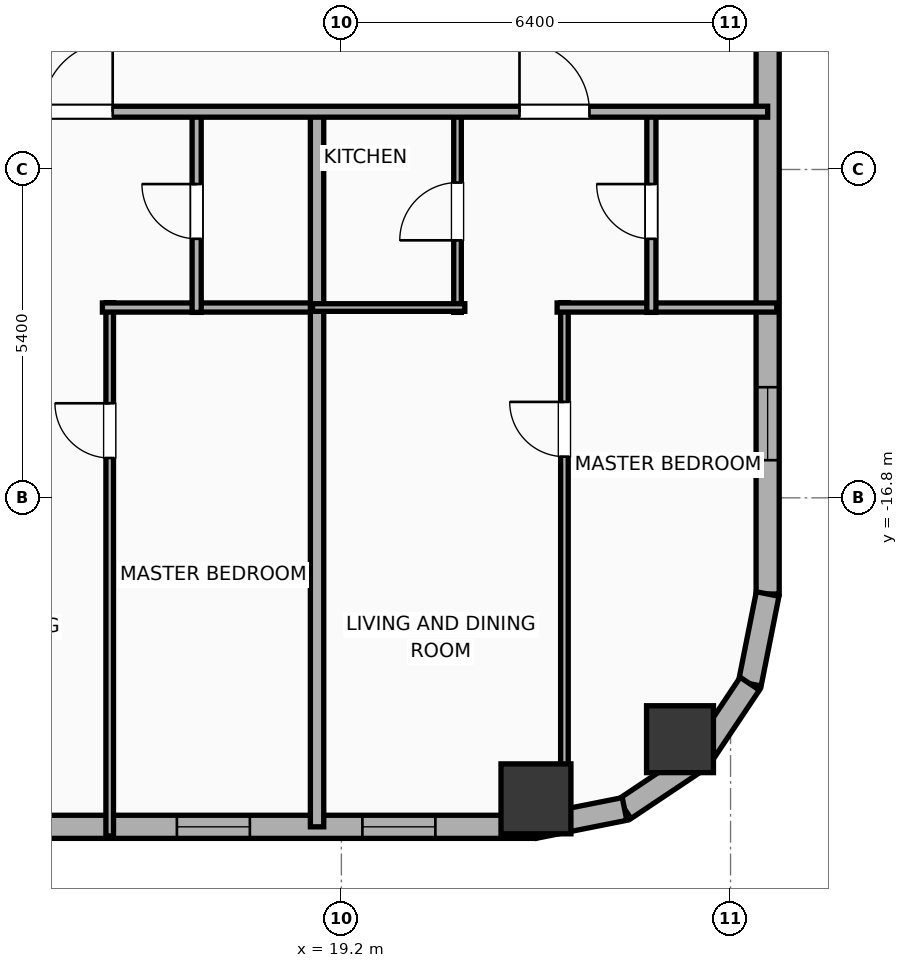
"""IFC4 building model, lengths in metres.
Left out: names, types, materials, properties, quantities, classifications, styles, units other than length and angle.
Written with IfcOpenShell. Run it as: python <this file> out.ifc"""

import sys

from ifc_helpers import new_model, si_unit, direction, frame, frame_2d, origin, origin_2d, place, context, subcontext, project, spatial, rectangle, hollow_rectangle, hollow_circle, extrude, element, fill, save


model = new_model("IFC4")
c1 = context("Model", 3, precision=1e-05, world=origin(), true_north=direction((0.0, 1.0)))
c2 = subcontext(c1, "Body", "Model", "MODEL_VIEW")
j1 = project(units=[si_unit("LENGTHUNIT", "METRE"), si_unit("PLANEANGLEUNIT", "RADIAN")], contexts=[c1])
p1 = place(None, origin())
s1 = spatial("IfcSite", under=j1, at=p1, CompositionType="ELEMENT")
p2 = place(p1, origin())
s2 = spatial("IfcBuilding", under=s1, at=p2, CompositionType="ELEMENT")
p3 = place(p2, frame((0.0, 0.0, 72.8)))
s3 = spatial("IfcBuildingStorey", under=s2, at=p3, CompositionType="ELEMENT", Elevation=72.8)
p4 = place(p3, frame((22.4, -21.75, 0.0), z_axis=(0.0, 0.0, 1.0), x_axis=(1.0, 0.0, 0.0)))
e1 = element("IfcColumn", 1, at=p4, inside=s3, PredefinedType="COLUMN", context=c2, shape_type="SweptSolid", body=[
    extrude(hollow_rectangle(XDim=1.15, YDim=1.15, WallThickness=0.04, at=origin_2d()), origin(), (0.0, 0.0, 1.0), 3.9),
])
p5 = place(p3, frame((24.769, -20.769, 0.0), z_axis=(0.0, 0.0, 1.0), x_axis=(1.0, 0.0, 0.0)))
e2 = element("IfcColumn", 2, at=p5, inside=s3, PredefinedType="COLUMN", context=c2, shape_type="SweptSolid", body=[
    extrude(hollow_circle(Radius=0.55, WallThickness=0.036, at=origin_2d()), origin(), (0.0, 0.0, 1.0), 3.9),
])
p6 = place(p3, frame((22.381, -22.21, 0.0), z_axis=(0.0, 0.0, 1.0), x_axis=(-1.0, 0.0, 0.0)))
e3 = element("IfcWall", 3, at=p6, inside=s3, PredefinedType="ELEMENTEDWALL", context=c2, shape_type="SweptSolid", body=[
    extrude(rectangle(XDim=51.963, YDim=0.38, at=frame_2d((25.981, 0.0))), origin(), (0.0, 0.0, 1.0), 3.65),
])
p7 = place(p6, frame((50.372, 0.0, 0.75)))
e4 = element("IfcOpeningElement", 4, at=p7, cuts=e3, PredefinedType="OPENING", context=c2, shape_type="SweptSolid", body=[
    extrude(rectangle(XDim=0.52, YDim=2.05, at=frame_2d((0.26, 1.025))), frame((0.0, 0.2, 0.0), z_axis=(0.0, -1.0, 0.0), x_axis=(1.0, 0.0, 0.0)), (0.0, 0.0, 1.0), 0.4),
])
p8 = place(p6, frame((45.681, 0.0, 0.75)))
e5 = element("IfcOpeningElement", 5, at=p8, cuts=e3, PredefinedType="OPENING", context=c2, shape_type="SweptSolid", body=[
    extrude(rectangle(XDim=1.2, YDim=2.05, at=frame_2d((0.6, 1.025))), frame((0.0, 0.2, 0.0), z_axis=(0.0, -1.0, 0.0), x_axis=(1.0, 0.0, 0.0)), (0.0, 0.0, 1.0), 0.4),
])
p9 = place(p6, frame((48.485, 0.0, 0.75)))
e6 = element("IfcOpeningElement", 6, at=p9, cuts=e3, PredefinedType="OPENING", context=c2, shape_type="SweptSolid", body=[
    extrude(rectangle(XDim=1.2, YDim=2.05, at=frame_2d((0.6, 1.025))), frame((0.0, 0.2, 0.0), z_axis=(0.0, -1.0, 0.0), x_axis=(1.0, 0.0, 0.0)), (0.0, 0.0, 1.0), 0.4),
])
p10 = place(p6, frame((42.426, 0.0, 0.75)))
e7 = element("IfcOpeningElement", 7, at=p10, cuts=e3, PredefinedType="OPENING", context=c2, shape_type="SweptSolid", body=[
    extrude(rectangle(XDim=1.2, YDim=2.05, at=frame_2d((0.6, 1.025))), frame((0.0, 0.2, 0.0), z_axis=(0.0, -1.0, 0.0), x_axis=(1.0, 0.0, 0.0)), (0.0, 0.0, 1.0), 0.4),
])
p11 = place(p6, frame((37.486, 0.0, 0.75)))
e8 = element("IfcOpeningElement", 8, at=p11, cuts=e3, PredefinedType="OPENING", context=c2, shape_type="SweptSolid", body=[
    extrude(rectangle(XDim=1.2, YDim=2.05, at=frame_2d((0.6, 1.025))), frame((0.0, 0.2, 0.0), z_axis=(0.0, -1.0, 0.0), x_axis=(1.0, 0.0, 0.0)), (0.0, 0.0, 1.0), 0.4),
])
p12 = place(p6, frame((33.386, 0.0, 0.75)))
e9 = element("IfcOpeningElement", 9, at=p12, cuts=e3, PredefinedType="OPENING", context=c2, shape_type="SweptSolid", body=[
    extrude(rectangle(XDim=1.2, YDim=2.05, at=frame_2d((0.6, 1.025))), frame((0.0, 0.2, 0.0), z_axis=(0.0, -1.0, 0.0), x_axis=(1.0, 0.0, 0.0)), (0.0, 0.0, 1.0), 0.4),
])
p13 = place(p6, frame((29.166, 0.0, 0.75)))
e10 = element("IfcOpeningElement", 10, at=p13, cuts=e3, PredefinedType="OPENING", context=c2, shape_type="SweptSolid", body=[
    extrude(rectangle(XDim=1.2, YDim=2.05, at=frame_2d((0.6, 1.025))), frame((0.0, 0.2, 0.0), z_axis=(0.0, -1.0, 0.0), x_axis=(1.0, 0.0, 0.0)), (0.0, 0.0, 1.0), 0.4),
])
p14 = place(p6, frame((26.081, 0.0, 0.75)))
e11 = element("IfcOpeningElement", 11, at=p14, cuts=e3, PredefinedType="OPENING", context=c2, shape_type="SweptSolid", body=[
    extrude(rectangle(XDim=1.2, YDim=2.05, at=frame_2d((0.6, 1.025))), frame((0.0, 0.2, 0.0), z_axis=(0.0, -1.0, 0.0), x_axis=(1.0, 0.0, 0.0)), (0.0, 0.0, 1.0), 0.4),
])
p15 = place(p6, frame((21.981, 0.0, 0.75)))
e12 = element("IfcOpeningElement", 12, at=p15, cuts=e3, PredefinedType="OPENING", context=c2, shape_type="SweptSolid", body=[
    extrude(rectangle(XDim=1.2, YDim=2.05, at=frame_2d((0.6, 1.025))), frame((0.0, 0.2, 0.0), z_axis=(0.0, -1.0, 0.0), x_axis=(1.0, 0.0, 0.0)), (0.0, 0.0, 1.0), 0.4),
])
p16 = place(p6, frame((16.986, 0.0, 0.75)))
e13 = element("IfcOpeningElement", 13, at=p16, cuts=e3, PredefinedType="OPENING", context=c2, shape_type="SweptSolid", body=[
    extrude(rectangle(XDim=1.2, YDim=2.05, at=frame_2d((0.6, 1.025))), frame((0.0, 0.2, 0.0), z_axis=(0.0, -1.0, 0.0), x_axis=(1.0, 0.0, 0.0)), (0.0, 0.0, 1.0), 0.4),
])
p17 = place(p6, frame((12.886, 0.0, 0.75)))
e14 = element("IfcOpeningElement", 14, at=p17, cuts=e3, PredefinedType="OPENING", context=c2, shape_type="SweptSolid", body=[
    extrude(rectangle(XDim=1.2, YDim=2.05, at=frame_2d((0.6, 1.025))), frame((0.0, 0.2, 0.0), z_axis=(0.0, -1.0, 0.0), x_axis=(1.0, 0.0, 0.0)), (0.0, 0.0, 1.0), 0.4),
])
p18 = place(p6, frame((8.306, 0.0, 0.75)))
e15 = element("IfcOpeningElement", 15, at=p18, cuts=e3, PredefinedType="OPENING", context=c2, shape_type="SweptSolid", body=[
    extrude(rectangle(XDim=1.2, YDim=2.05, at=frame_2d((0.6, 1.025))), frame((0.0, 0.2, 0.0), z_axis=(0.0, -1.0, 0.0), x_axis=(1.0, 0.0, 0.0)), (0.0, 0.0, 1.0), 0.4),
])
p19 = place(p6, frame((4.686, 0.0, 0.75)))
e16 = element("IfcOpeningElement", 16, at=p19, cuts=e3, PredefinedType="OPENING", context=c2, shape_type="SweptSolid", body=[
    extrude(rectangle(XDim=1.2, YDim=2.05, at=frame_2d((0.6, 1.025))), frame((0.0, 0.2, 0.0), z_axis=(0.0, -1.0, 0.0), x_axis=(1.0, 0.0, 0.0)), (0.0, 0.0, 1.0), 0.4),
])
p20 = place(p6, frame((1.635, 0.0, 0.75)))
e17 = element("IfcOpeningElement", 17, at=p20, cuts=e3, PredefinedType="OPENING", context=c2, shape_type="SweptSolid", body=[
    extrude(rectangle(XDim=1.2, YDim=2.05, at=frame_2d((0.6, 1.025))), frame((0.0, 0.2, 0.0), z_axis=(0.0, -1.0, 0.0), x_axis=(1.0, 0.0, 0.0)), (0.0, 0.0, 1.0), 0.4),
])
p21 = place(p3, frame((26.21, 18.381, 0.0), z_axis=(0.0, 0.0, 1.0), x_axis=(0.0, -1.0, 0.0)))
e18 = element("IfcWall", 18, at=p21, inside=s3, PredefinedType="ELEMENTEDWALL", context=c2, shape_type="SweptSolid", body=[
    extrude(rectangle(XDim=36.763, YDim=0.38, at=frame_2d((18.381, 0.0))), origin(), (0.0, 0.0, 1.0), 3.65),
])
p22 = place(p21, frame((33.362, 0.0, 0.75)))
e19 = element("IfcOpeningElement", 19, at=p22, cuts=e18, PredefinedType="OPENING", context=c2, shape_type="SweptSolid", body=[
    extrude(rectangle(XDim=1.2, YDim=2.05, at=frame_2d((0.6, 1.025))), frame((0.0, 0.2, 0.0), z_axis=(0.0, -1.0, 0.0), x_axis=(1.0, 0.0, 0.0)), (0.0, 0.0, 1.0), 0.4),
])
p23 = place(p3, frame((26.21, -18.381, 0.0), z_axis=(0.0, 0.0, 1.0), x_axis=(-0.195086038585, -0.980786132421, 0.0)))
e20 = element("IfcWall", 20, at=p23, inside=s3, PredefinedType="ELEMENTEDWALL", context=c2, shape_type="SweptSolid", body=[
    extrude(rectangle(XDim=1.504, YDim=0.38, at=frame_2d((0.752, 0.0))), origin(), (0.0, 0.0, 1.0), 3.65),
])
for number, where, z_axis, x_axis in (
    (21, (25.917, -19.857, 0.0), (0.0, 0.0, 1.0), (-0.556, -0.831, 0.0)),
    (22, (25.091, -21.091, 0.0), (0.0, 0.0, 1.0), (-0.831, -0.556, 0.0)),
):
    element("IfcWall", number, at=place(p3, frame(where, z_axis=z_axis, x_axis=x_axis)), inside=s3, PredefinedType="ELEMENTEDWALL", context=c2, shape_type="SweptSolid", body=[
        extrude(rectangle(XDim=1.485, YDim=0.38, at=frame_2d((0.743, 0.0))), origin(), (0.0, 0.0, 1.0), 3.65),
    ])
p24 = place(p3, frame((23.857, -21.917, 0.0), z_axis=(0.0, 0.0, 1.0), x_axis=(-0.980786132421, -0.195086038585, 0.0)))
e23 = element("IfcWall", 23, at=p24, inside=s3, PredefinedType="ELEMENTEDWALL", context=c2, shape_type="SweptSolid", body=[
    extrude(rectangle(XDim=1.504, YDim=0.38, at=frame_2d((0.752, 0.0))), origin(), (0.0, 0.0, 1.0), 3.65),
])
p25 = place(p3, frame((15.39, -22.36, 0.0), z_axis=(0.0, 0.0, 1.0), x_axis=(0.0, 1.0, 0.0)))
e24 = element("IfcWall", 24, at=p25, inside=s3, PredefinedType="PARTITIONING", context=c2, shape_type="SweptSolid", body=[
    extrude(rectangle(XDim=8.77, YDim=0.125, at=frame_2d((4.385, 0.0))), origin(), (0.0, 0.0, 1.0), 3.65),
])
p26 = place(p25, frame((6.215, 0.0, 0.0)))
e25 = element("IfcOpeningElement", 25, at=p26, cuts=e24, PredefinedType="OPENING", context=c2, shape_type="SweptSolid", body=[
    extrude(rectangle(XDim=0.9, YDim=2.05, at=frame_2d((0.45, 1.025))), frame((0.0, 0.073, 0.0), z_axis=(0.0, -1.0, 0.0), x_axis=(1.0, 0.0, 0.0)), (0.0, 0.0, 1.0), 0.145),
])
p27 = place(p3, frame((15.27, -13.67, 0.0), z_axis=(0.0, 0.0, 1.0), x_axis=(1.0, 0.0, 0.0)))
e26 = element("IfcWall", 26, at=p27, inside=s3, PredefinedType="PLUMBINGWALL", context=c2, shape_type="SweptSolid", body=[
    extrude(rectangle(XDim=3.605, YDim=0.15, at=frame_2d((1.802, 0.0))), origin(), (0.0, 0.0, 1.0), 3.65),
])
p28 = place(p3, frame((16.82, -13.75, 0.0), z_axis=(0.0, 0.0, 1.0), x_axis=(0.0, 1.0, 0.0)))
e27 = element("IfcWall", 27, at=p28, inside=s3, PredefinedType="PLUMBINGWALL", context=c2, shape_type="SweptSolid", body=[
    extrude(rectangle(XDim=3.32, YDim=0.15, at=frame_2d((1.66, 0.0))), origin(), (0.0, 0.0, 1.0), 3.65),
])
p29 = place(p28, frame((1.21, 0.0, 0.0)))
e28 = element("IfcOpeningElement", 28, at=p29, cuts=e27, PredefinedType="OPENING", context=c2, shape_type="SweptSolid", body=[
    extrude(rectangle(XDim=0.9, YDim=2.05, at=frame_2d((0.45, 1.025))), frame((0.0, 0.085, 0.0), z_axis=(0.0, -1.0, 0.0), x_axis=(1.0, 0.0, 0.0)), (0.0, 0.0, 1.0), 0.17),
])
p30 = place(p3, frame((18.8, -22.21, 0.0), z_axis=(0.0, 0.0, 1.0), x_axis=(0.0, 1.0, 0.0)))
e29 = element("IfcWall", 29, at=p30, inside=s3, PredefinedType="PARTITIONING", context=c2, shape_type="SweptSolid", body=[
    extrude(rectangle(XDim=11.84, YDim=0.22, at=frame_2d((5.92, 0.0))), origin(), (0.0, 0.0, 1.0), 3.65),
])
p31 = place(p3, frame((22.868, -22.266, 0.0), z_axis=(0.0, 0.0, 1.0), x_axis=(0.0, 1.0, 0.0)))
e30 = element("IfcWall", 30, at=p31, inside=s3, PredefinedType="PARTITIONING", context=c2, shape_type="SweptSolid", body=[
    extrude(rectangle(XDim=8.676, YDim=0.125, at=frame_2d((4.338, 0.0))), origin(), (0.0, 0.0, 1.0), 3.65),
])
p32 = place(p31, frame((6.144, 0.0, 0.0)))
e31 = element("IfcOpeningElement", 31, at=p32, cuts=e30, PredefinedType="OPENING", context=c2, shape_type="SweptSolid", body=[
    extrude(rectangle(XDim=0.9, YDim=2.05, at=frame_2d((0.45, 1.025))), frame((0.0, 0.073, 0.0), z_axis=(0.0, -1.0, 0.0), x_axis=(1.0, 0.0, 0.0)), (0.0, 0.0, 1.0), 0.145),
])
p33 = place(p3, frame((22.748, -13.67, 0.0), z_axis=(0.0, 0.0, 1.0), x_axis=(1.0, 0.0, 0.0)))
e32 = element("IfcWall", 32, at=p33, inside=s3, PredefinedType="PLUMBINGWALL", context=c2, shape_type="SweptSolid", body=[
    extrude(rectangle(XDim=3.612, YDim=0.15, at=frame_2d((1.806, 0.0))), origin(), (0.0, 0.0, 1.0), 3.65),
])
p34 = place(p3, frame((21.11, -13.75, 0.0), z_axis=(0.0, 0.0, 1.0), x_axis=(0.0, 1.0, 0.0)))
e33 = element("IfcWall", 33, at=p34, inside=s3, PredefinedType="PARTITIONING", context=c2, shape_type="SweptSolid", body=[
    extrude(rectangle(XDim=3.32, YDim=0.125, at=frame_2d((1.66, 0.0))), origin(), (0.0, 0.0, 1.0), 3.65),
])
p35 = place(p34, frame((1.185, 0.0, 0.0)))
e34 = element("IfcOpeningElement", 34, at=p35, cuts=e33, PredefinedType="OPENING", context=c2, shape_type="SweptSolid", body=[
    extrude(rectangle(XDim=0.95, YDim=2.05, at=frame_2d((0.475, 1.025))), frame((0.0, 0.073, 0.0), z_axis=(0.0, -1.0, 0.0), x_axis=(1.0, 0.0, 0.0)), (0.0, 0.0, 1.0), 0.145),
])
p36 = place(p3, frame((18.725, -13.67, 0.0), z_axis=(0.0, 0.0, 1.0), x_axis=(1.0, 0.0, 0.0)))
e35 = element("IfcWall", 35, at=p36, inside=s3, PredefinedType="PARTITIONING", context=c2, shape_type="SweptSolid", body=[
    extrude(rectangle(XDim=2.505, YDim=0.125, at=frame_2d((1.252, 0.0))), origin(), (0.0, 0.0, 1.0), 3.65),
])
p37 = place(p3, frame((24.298, -13.75, 0.0), z_axis=(0.0, 0.0, 1.0), x_axis=(0.0, 1.0, 0.0)))
e36 = element("IfcWall", 36, at=p37, inside=s3, PredefinedType="PLUMBINGWALL", context=c2, shape_type="SweptSolid", body=[
    extrude(rectangle(XDim=3.32, YDim=0.15, at=frame_2d((1.66, 0.0))), origin(), (0.0, 0.0, 1.0), 3.65),
])
p38 = place(p37, frame((1.21, 0.0, 0.0)))
e37 = element("IfcOpeningElement", 37, at=p38, cuts=e36, PredefinedType="OPENING", context=c2, shape_type="SweptSolid", body=[
    extrude(rectangle(XDim=0.9, YDim=2.05, at=frame_2d((0.45, 1.025))), frame((0.0, 0.085, 0.0), z_axis=(0.0, -1.0, 0.0), x_axis=(1.0, 0.0, 0.0)), (0.0, 0.0, 1.0), 0.17),
])
p39 = place(p3, frame((-33.41, -10.45, 0.0), z_axis=(0.0, 0.0, 1.0), x_axis=(1.0, 0.0, 0.0)))
e38 = element("IfcWall", 38, at=p39, inside=s3, PredefinedType="PARTITIONING", context=c2, shape_type="SweptSolid", body=[
    extrude(rectangle(XDim=59.62, YDim=0.18, at=frame_2d((29.81, 0.0))), origin(), (0.0, 0.0, 1.0), 3.65),
])
p40 = place(p39, frame((2.495, 0.0, 0.0)))
e39 = element("IfcOpeningElement", 39, at=p40, cuts=e38, PredefinedType="OPENING", context=c2, shape_type="SweptSolid", body=[
    extrude(rectangle(XDim=0.9, YDim=2.05, at=frame_2d((0.45, 1.025))), frame((0.0, 0.1, 0.0), z_axis=(0.0, -1.0, 0.0), x_axis=(1.0, 0.0, 0.0)), (0.0, 0.0, 1.0), 0.2),
])
p41 = place(p39, frame((8.905, 0.0, 0.0)))
e40 = element("IfcOpeningElement", 40, at=p41, cuts=e38, PredefinedType="OPENING", context=c2, shape_type="SweptSolid", body=[
    extrude(rectangle(XDim=1.15, YDim=2.05, at=frame_2d((0.575, 1.025))), frame((0.0, 0.1, 0.0), z_axis=(0.0, -1.0, 0.0), x_axis=(1.0, 0.0, 0.0)), (0.0, 0.0, 1.0), 0.2),
])
p42 = place(p39, frame((14.902, 0.0, 0.0)))
e41 = element("IfcOpeningElement", 41, at=p42, cuts=e38, PredefinedType="OPENING", context=c2, shape_type="SweptSolid", body=[
    extrude(rectangle(XDim=1.15, YDim=2.05, at=frame_2d((0.575, 1.025))), frame((0.0, 0.1, 0.0), z_axis=(0.0, -1.0, 0.0), x_axis=(1.0, 0.0, 0.0)), (0.0, 0.0, 1.0), 0.2),
])
p43 = place(p39, frame((23.112, 0.0, 0.0)))
e42 = element("IfcOpeningElement", 42, at=p43, cuts=e38, PredefinedType="OPENING", context=c2, shape_type="SweptSolid", body=[
    extrude(rectangle(XDim=1.15, YDim=2.05, at=frame_2d((0.575, 1.025))), frame((0.0, 0.1, 0.0), z_axis=(0.0, -1.0, 0.0), x_axis=(1.0, 0.0, 0.0)), (0.0, 0.0, 1.0), 0.2),
])
p44 = place(p39, frame((31.572, 0.0, 0.0)))
e43 = element("IfcOpeningElement", 43, at=p44, cuts=e38, PredefinedType="OPENING", context=c2, shape_type="SweptSolid", body=[
    extrude(rectangle(XDim=0.9, YDim=2.05, at=frame_2d((0.45, 1.025))), frame((0.0, 0.1, 0.0), z_axis=(0.0, -1.0, 0.0), x_axis=(1.0, 0.0, 0.0)), (0.0, 0.0, 1.0), 0.2),
])
p45 = place(p39, frame((39.502, 0.0, 0.0)))
e44 = element("IfcOpeningElement", 44, at=p45, cuts=e38, PredefinedType="OPENING", context=c2, shape_type="SweptSolid", body=[
    extrude(rectangle(XDim=1.15, YDim=2.05, at=frame_2d((0.575, 1.025))), frame((0.0, 0.1, 0.0), z_axis=(0.0, -1.0, 0.0), x_axis=(1.0, 0.0, 0.0)), (0.0, 0.0, 1.0), 0.2),
])
p46 = place(p39, frame((47.699, 0.0, 0.0)))
e45 = element("IfcOpeningElement", 45, at=p46, cuts=e38, PredefinedType="OPENING", context=c2, shape_type="SweptSolid", body=[
    extrude(rectangle(XDim=1.15, YDim=2.05, at=frame_2d((0.575, 1.025))), frame((0.0, 0.1, 0.0), z_axis=(0.0, -1.0, 0.0), x_axis=(1.0, 0.0, 0.0)), (0.0, 0.0, 1.0), 0.2),
])
p47 = place(p39, frame((55.539, 0.0, 0.0)))
e46 = element("IfcOpeningElement", 46, at=p47, cuts=e38, PredefinedType="OPENING", context=c2, shape_type="SweptSolid", body=[
    extrude(rectangle(XDim=1.15, YDim=2.05, at=frame_2d((0.575, 1.025))), frame((0.0, 0.1, 0.0), z_axis=(0.0, -1.0, 0.0), x_axis=(1.0, 0.0, 0.0)), (0.0, 0.0, 1.0), 0.2),
])
p48 = place(p19, origin())
e47 = element("IfcWindow", 47, at=p48, inside=s3, PartitioningType="SINGLE_PANEL", PredefinedType="WINDOW", context=c2, shape_type="SweptSolid", body=[
    extrude(rectangle(XDim=1.2, YDim=2.05, at=frame_2d((0.6, 1.025))), frame((0.0, 0.03, 0.0), z_axis=(0.0, -1.0, 0.0), x_axis=(1.0, 0.0, 0.0)), (0.0, 0.0, 1.0), 0.06),
])
fill(e16, e47)
p49 = place(p20, origin())
e48 = element("IfcWindow", 48, at=p49, inside=s3, PartitioningType="SINGLE_PANEL", PredefinedType="WINDOW", context=c2, shape_type="SweptSolid", body=[
    extrude(rectangle(XDim=1.2, YDim=2.05, at=frame_2d((0.6, 1.025))), frame((0.0, 0.03, 0.0), z_axis=(0.0, -1.0, 0.0), x_axis=(1.0, 0.0, 0.0)), (0.0, 0.0, 1.0), 0.06),
])
fill(e17, e48)
p50 = place(p22, origin())
e49 = element("IfcWindow", 49, at=p50, inside=s3, PartitioningType="SINGLE_PANEL", PredefinedType="WINDOW", context=c2, shape_type="SweptSolid", body=[
    extrude(rectangle(XDim=1.2, YDim=2.05, at=frame_2d((0.6, 1.025))), frame((0.0, 0.03, 0.0), z_axis=(0.0, -1.0, 0.0), x_axis=(1.0, 0.0, 0.0)), (0.0, 0.0, 1.0), 0.06),
])
fill(e19, e49)
p51 = place(p26, origin())
e50 = element("IfcDoor", 50, at=p51, inside=s3, OperationType="SINGLE_SWING_RIGHT", PredefinedType="DOOR", context=c2, shape_type="SweptSolid", body=[
    extrude(rectangle(XDim=0.9, YDim=2.05, at=frame_2d((0.45, 1.025))), frame((0.0, 0.025, 0.0), z_axis=(0.0, -1.0, 0.0), x_axis=(1.0, 0.0, 0.0)), (0.0, 0.0, 1.0), 0.05),
])
fill(e25, e50)
p52 = place(p29, origin())
e51 = element("IfcDoor", 51, at=p52, inside=s3, OperationType="SINGLE_SWING_RIGHT", PredefinedType="DOOR", context=c2, shape_type="SweptSolid", body=[
    extrude(rectangle(XDim=0.9, YDim=2.05, at=frame_2d((0.45, 1.025))), frame((0.0, 0.025, 0.0), z_axis=(0.0, -1.0, 0.0), x_axis=(1.0, 0.0, 0.0)), (0.0, 0.0, 1.0), 0.05),
])
fill(e28, e51)
p53 = place(p32, origin())
e52 = element("IfcDoor", 52, at=p53, inside=s3, OperationType="SINGLE_SWING_RIGHT", PredefinedType="DOOR", context=c2, shape_type="SweptSolid", body=[
    extrude(rectangle(XDim=0.9, YDim=2.05, at=frame_2d((0.45, 1.025))), frame((0.0, 0.025, 0.0), z_axis=(0.0, -1.0, 0.0), x_axis=(1.0, 0.0, 0.0)), (0.0, 0.0, 1.0), 0.05),
])
fill(e31, e52)
p54 = place(p35, origin())
e53 = element("IfcDoor", 53, at=p54, inside=s3, OperationType="SINGLE_SWING_LEFT", PredefinedType="DOOR", context=c2, shape_type="SweptSolid", body=[
    extrude(rectangle(XDim=0.95, YDim=2.05, at=frame_2d((0.475, 1.025))), frame((0.0, 0.025, 0.0), z_axis=(0.0, -1.0, 0.0), x_axis=(1.0, 0.0, 0.0)), (0.0, 0.0, 1.0), 0.05),
])
fill(e34, e53)
p55 = place(p38, origin())
e54 = element("IfcDoor", 54, at=p55, inside=s3, OperationType="SINGLE_SWING_RIGHT", PredefinedType="DOOR", context=c2, shape_type="SweptSolid", body=[
    extrude(rectangle(XDim=0.9, YDim=2.05, at=frame_2d((0.45, 1.025))), frame((0.0, 0.025, 0.0), z_axis=(0.0, -1.0, 0.0), x_axis=(1.0, 0.0, 0.0)), (0.0, 0.0, 1.0), 0.05),
])
fill(e37, e54)
p56 = place(p46, origin())
e55 = element("IfcDoor", 55, at=p56, inside=s3, OperationType="SINGLE_SWING_RIGHT", PredefinedType="DOOR", context=c2, shape_type="SweptSolid", body=[
    extrude(rectangle(XDim=1.15, YDim=2.05, at=frame_2d((0.575, 1.025))), frame((0.0, 0.025, 0.0), z_axis=(0.0, -1.0, 0.0), x_axis=(1.0, 0.0, 0.0)), (0.0, 0.0, 1.0), 0.05),
])
fill(e45, e55)
p57 = place(p47, origin())
e56 = element("IfcDoor", 56, at=p57, inside=s3, OperationType="SINGLE_SWING_LEFT", PredefinedType="DOOR", context=c2, shape_type="SweptSolid", body=[
    extrude(rectangle(XDim=1.15, YDim=2.05, at=frame_2d((0.575, 1.025))), frame((0.0, 0.025, 0.0), z_axis=(0.0, -1.0, 0.0), x_axis=(1.0, 0.0, 0.0)), (0.0, 0.0, 1.0), 0.05),
])
fill(e46, e56)
save(model, sys.argv[1])
